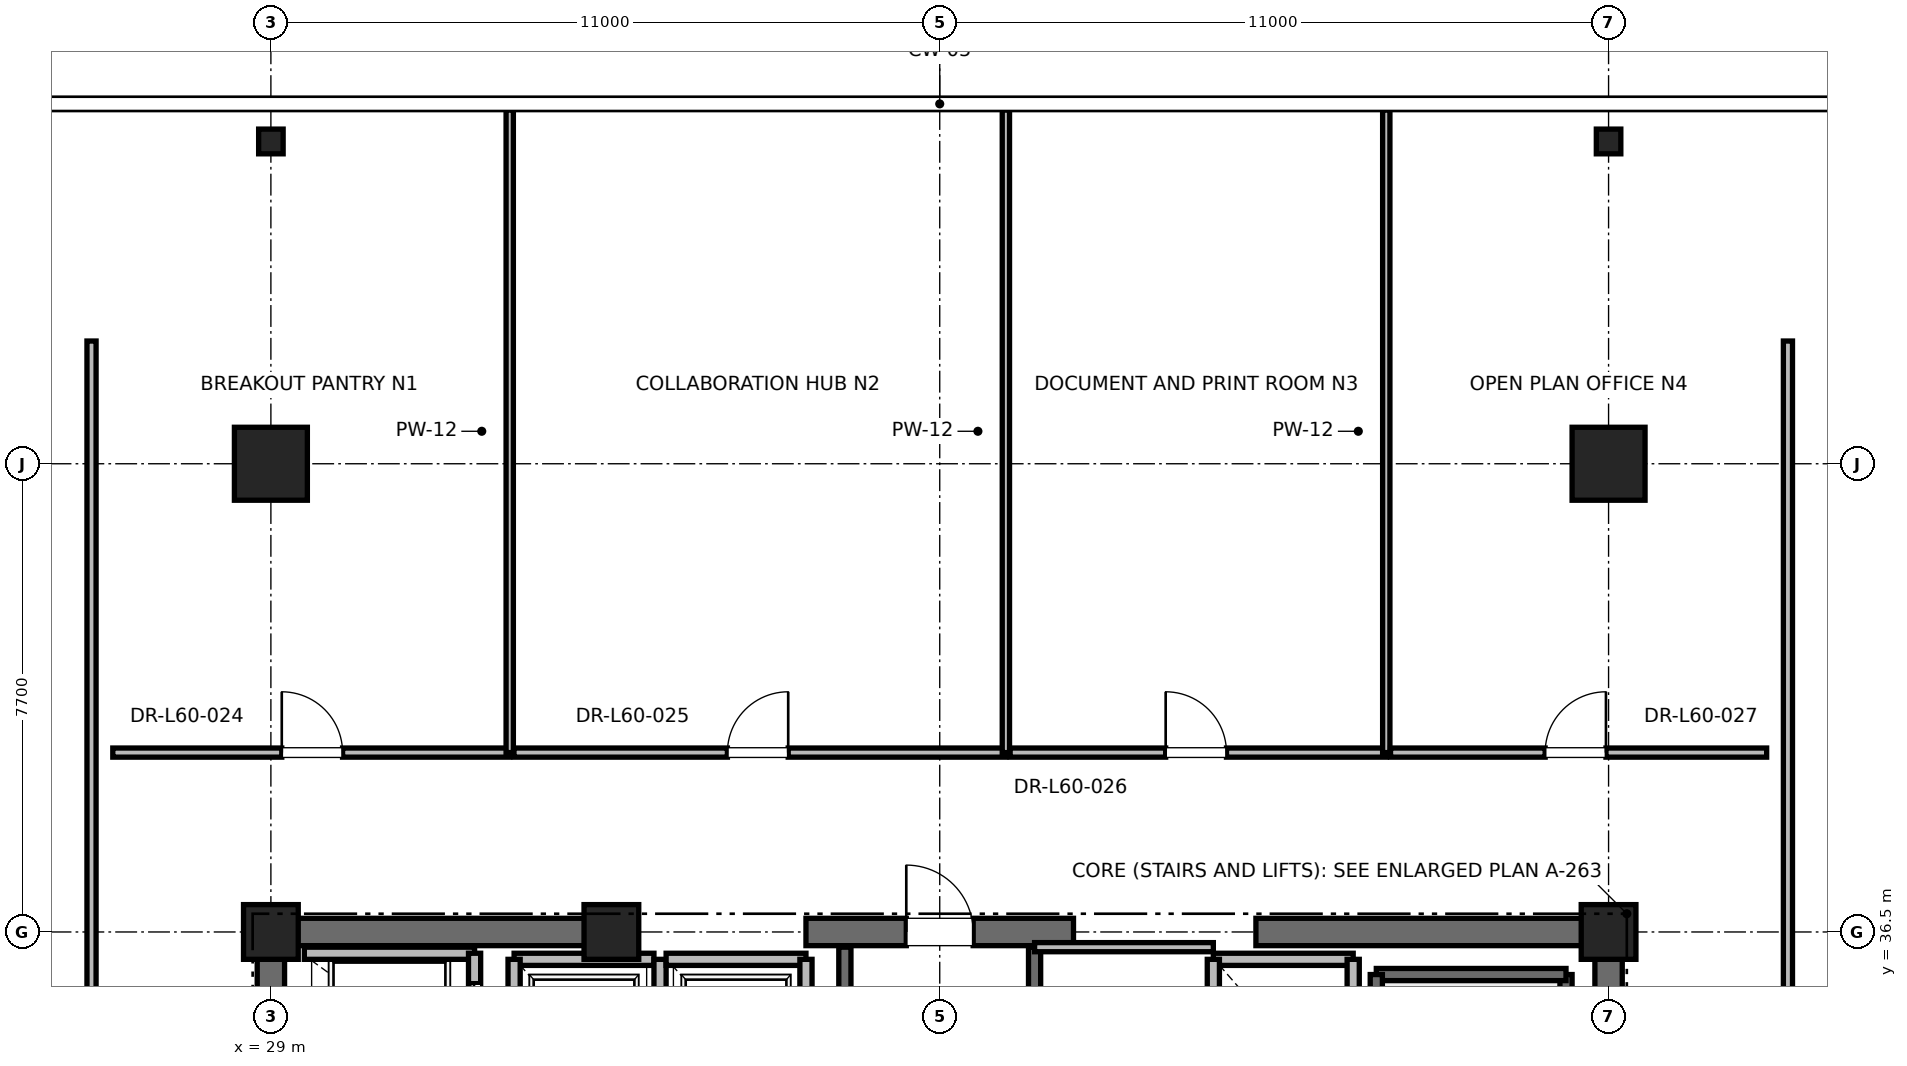
"""IFC4 building model, lengths in metres.
Left out: names, types, materials, properties, quantities, classifications, styles, units other than length and angle.
Written with IfcOpenShell. Run it as: python <this file> out.ifc"""

import sys

from ifc_helpers import new_model, si_unit, direction, frame, frame_2d, origin, origin_2d, place, context, subcontext, project, spatial, rectangle, i_section, extrude, element, fill, save


model = new_model("IFC4")
c1 = context("Model", 3, precision=1e-05, world=origin(), true_north=direction((0.0, 1.0)))
c2 = subcontext(c1, "Body", "Model", "MODEL_VIEW")
j1 = project(units=[si_unit("LENGTHUNIT", "METRE"), si_unit("PLANEANGLEUNIT", "RADIAN")], contexts=[c1])
p1 = place(None, origin())
s1 = spatial("IfcSite", under=j1, at=p1, CompositionType="ELEMENT")
p2 = place(p1, origin())
s2 = spatial("IfcBuilding", under=s1, at=p2, CompositionType="ELEMENT")
p3 = place(p2, frame((0.0, 0.0, 259.2)))
s3 = spatial("IfcBuildingStorey", under=s2, at=p3, CompositionType="ELEMENT", Elevation=259.2)
for number, where, z_axis, x_axis in (
    (1, (29.0, 44.2, 0.0), (0.0, 0.0, 1.0), (1.0, 0.0, 0.0)),
    (2, (51.0, 44.2, 0.0), (0.0, 0.0, 1.0), (1.0, 0.0, 0.0)),
):
    element("IfcColumn", number, at=place(p3, frame(where, z_axis=z_axis, x_axis=x_axis)), inside=s3, PredefinedType="COLUMN", context=c2, shape_type="SweptSolid", body=[
        extrude(rectangle(XDim=1.2, YDim=1.2, at=origin_2d()), origin(), (0.0, 0.0, 1.0), 4.0),
    ])
for number, where, z_axis, x_axis in (
    (3, (29.0, 49.5, 0.0), (0.0, 0.0, 1.0), (1.0, 0.0, 0.0)),
    (4, (51.0, 49.5, 0.0), (0.0, 0.0, 1.0), (1.0, 0.0, 0.0)),
):
    element("IfcColumn", number, at=place(p3, frame(where, z_axis=z_axis, x_axis=x_axis)), inside=s3, PredefinedType="COLUMN", context=c2, shape_type="SweptSolid", body=[
        extrude(i_section(OverallWidth=0.403, OverallDepth=0.406, WebThickness=0.027, FlangeThickness=0.043, FilletRadius=0.015, at=origin_2d()), origin(), (0.0, 0.0, 1.0), 4.0),
    ])
for number, where, z_axis, x_axis in (
    (5, (29.0, 36.5, 0.0), (0.0, 0.0, 1.0), (1.0, 0.0, 0.0)),
    (6, (51.0, 36.5, 0.0), (0.0, 0.0, 1.0), (1.0, 0.0, 0.0)),
    (7, (34.6, 36.5, 0.0), (0.0, 0.0, 1.0), (1.0, 0.0, 0.0)),
):
    element("IfcColumn", number, at=place(p3, frame(where, z_axis=z_axis, x_axis=x_axis)), inside=s3, PredefinedType="PILASTER", context=c2, shape_type="SweptSolid", body=[
        extrude(rectangle(XDim=0.9, YDim=0.9, at=origin_2d()), origin(), (0.0, 0.0, 1.0), 4.0),
    ])
p4 = place(p3, frame((29.0, 36.5, 0.0), z_axis=(0.0, 0.0, 1.0), x_axis=(1.0, 0.0, 0.0)))
e8 = element("IfcWall", 8, at=p4, inside=s3, PredefinedType="SHEAR", context=c2, shape_type="SweptSolid", body=[
    extrude(rectangle(XDim=5.8, YDim=0.45, at=frame_2d((2.9, 0.0))), origin(), (0.0, 0.0, 1.0), 3.785),
])
p5 = place(p3, frame((37.8, 36.5, 0.0), z_axis=(0.0, 0.0, 1.0), x_axis=(1.0, 0.0, 0.0)))
e9 = element("IfcWall", 9, at=p5, inside=s3, PredefinedType="SHEAR", context=c2, shape_type="SweptSolid", body=[
    extrude(rectangle(XDim=4.4, YDim=0.45, at=frame_2d((2.2, 0.0))), origin(), (0.0, 0.0, 1.0), 3.785),
])
p6 = place(p5, frame((1.65, 0.0, 0.0)))
e10 = element("IfcOpeningElement", 10, at=p6, cuts=e9, PredefinedType="OPENING", context=c2, shape_type="SweptSolid", body=[
    extrude(rectangle(XDim=1.1, YDim=2.15, at=frame_2d((0.55, 1.075))), frame((0.0, 0.225, 0.0), z_axis=(0.0, -1.0, 0.0), x_axis=(1.0, 0.0, 0.0)), (0.0, 0.0, 1.0), 0.45),
])
for number, where, z_axis, x_axis in (
    (11, (45.2, 36.5, 0.0), (0.0, 0.0, 1.0), (1.0, 0.0, 0.0)),
    (12, (29.0, 30.7, 0.0), (0.0, 0.0, 1.0), (0.0, 1.0, 0.0)),
):
    element("IfcWall", number, at=place(p3, frame(where, z_axis=z_axis, x_axis=x_axis)), inside=s3, PredefinedType="SHEAR", context=c2, shape_type="SweptSolid", body=[
        extrude(rectangle(XDim=5.8, YDim=0.45, at=frame_2d((2.9, 0.0))), origin(), (0.0, 0.0, 1.0), 3.785),
    ])
p7 = place(p3, frame((51.0, 27.7, 0.0), z_axis=(0.0, 0.0, 1.0), x_axis=(0.0, 1.0, 0.0)))
e13 = element("IfcWall", 13, at=p7, inside=s3, PredefinedType="SHEAR", context=c2, shape_type="SweptSolid", body=[
    extrude(rectangle(XDim=8.8, YDim=0.45, at=frame_2d((4.4, 0.0))), origin(), (0.0, 0.0, 1.0), 3.785),
])
p8 = place(p3, frame((50.3, 27.65, 0.0), z_axis=(0.0, 0.0, 1.0), x_axis=(0.0, 1.0, 0.0)))
e14 = element("IfcWall", 14, at=p8, inside=s3, PredefinedType="SOLIDWALL", context=c2, shape_type="SweptSolid", body=[
    extrude(rectangle(XDim=8.15, YDim=0.2, at=frame_2d((4.075, 0.0))), origin(), (0.0, 0.0, 1.0), 3.785),
])
p9 = place(p3, frame((47.18, 35.8, 0.0), z_axis=(0.0, 0.0, 1.0), x_axis=(1.0, 0.0, 0.0)))
e15 = element("IfcWall", 15, at=p9, inside=s3, PredefinedType="SOLIDWALL", context=c2, shape_type="SweptSolid", body=[
    extrude(rectangle(XDim=3.12, YDim=0.2, at=frame_2d((1.56, 0.0))), origin(), (0.0, 0.0, 1.0), 3.785),
])
p10 = place(p3, frame((47.18, 27.62, 0.0), z_axis=(0.0, 0.0, 1.0), x_axis=(0.0, 1.0, 0.0)))
e16 = element("IfcWall", 16, at=p10, inside=s3, PredefinedType="SOLIDWALL", context=c2, shape_type="SweptSolid", body=[
    extrude(rectangle(XDim=8.18, YDim=0.2, at=frame_2d((4.09, 0.0))), origin(), (0.0, 0.0, 1.0), 3.785),
])
p11 = place(p3, frame((38.44, 27.38, 0.0), z_axis=(0.0, 0.0, 1.0), x_axis=(0.0, 1.0, 0.0)))
e17 = element("IfcWall", 17, at=p11, inside=s3, PredefinedType="SOLIDWALL", context=c2, shape_type="SweptSolid", body=[
    extrude(rectangle(XDim=8.87, YDim=0.2, at=frame_2d((4.435, 0.0))), origin(), (0.0, 0.0, 1.0), 3.785),
])
p12 = place(p3, frame((41.56, 27.68, 0.0), z_axis=(0.0, 0.0, 1.0), x_axis=(0.0, 1.0, 0.0)))
e18 = element("IfcWall", 18, at=p12, inside=s3, PredefinedType="SOLIDWALL", context=c2, shape_type="SweptSolid", body=[
    extrude(rectangle(XDim=8.57, YDim=0.2, at=frame_2d((4.285, 0.0))), origin(), (0.0, 0.0, 1.0), 3.785),
])
p13 = place(p3, frame((32.35, 36.15, 0.0), z_axis=(0.0, 0.0, 1.0), x_axis=(-1.0, 0.0, 0.0)))
e19 = element("IfcWall", 19, at=p13, inside=s3, PredefinedType="SOLIDWALL", context=c2, shape_type="SweptSolid", body=[
    extrude(rectangle(XDim=2.8, YDim=0.2, at=frame_2d((1.4, 0.0))), origin(), (0.0, 0.0, 1.0), 3.148),
])
p14 = place(p3, frame((32.35, 34.05, 0.0), z_axis=(0.0, 0.0, 1.0), x_axis=(0.0, 1.0, 0.0)))
e20 = element("IfcWall", 20, at=p14, inside=s3, PredefinedType="SOLIDWALL", context=c2, shape_type="SweptSolid", body=[
    extrude(rectangle(XDim=2.1, YDim=0.2, at=frame_2d((1.05, 0.0))), origin(), (0.0, 0.0, 1.0), 3.785),
])
p15 = place(p14, frame((0.5, 0.0, 0.0)))
e21 = element("IfcOpeningElement", 21, at=p15, cuts=e20, PredefinedType="OPENING", context=c2, shape_type="SweptSolid", body=[
    extrude(rectangle(XDim=1.1, YDim=2.2, at=frame_2d((0.55, 1.1))), frame((0.0, 0.1, 0.0), z_axis=(0.0, -1.0, 0.0), x_axis=(1.0, 0.0, 0.0)), (0.0, 0.0, 1.0), 0.2),
])
p16 = place(p3, frame((35.3, 36.05, 0.0), z_axis=(0.0, 0.0, 1.0), x_axis=(-1.0, 0.0, 0.0)))
e22 = element("IfcWall", 22, at=p16, inside=s3, PredefinedType="SOLIDWALL", context=c2, shape_type="SweptSolid", body=[
    extrude(rectangle(XDim=2.3, YDim=0.2, at=frame_2d((1.15, 0.0))), origin(), (0.0, 0.0, 1.0), 2.865),
])
p17 = place(p3, frame((33.0, 36.05, 0.0), z_axis=(0.0, 0.0, 1.0), x_axis=(0.0, -1.0, 0.0)))
e23 = element("IfcWall", 23, at=p17, inside=s3, PredefinedType="SOLIDWALL", context=c2, shape_type="SweptSolid", body=[
    extrude(rectangle(XDim=2.6, YDim=0.2, at=frame_2d((1.3, 0.0))), origin(), (0.0, 0.0, 1.0), 3.785),
])
p18 = place(p3, frame((35.4, 33.45, 0.0), z_axis=(0.0, 0.0, 1.0), x_axis=(0.0, 1.0, 0.0)))
e24 = element("IfcWall", 24, at=p18, inside=s3, PredefinedType="SOLIDWALL", context=c2, shape_type="SweptSolid", body=[
    extrude(rectangle(XDim=2.6, YDim=0.2, at=frame_2d((1.3, 0.0))), origin(), (0.0, 0.0, 1.0), 2.865),
])
p19 = place(p3, frame((37.8, 36.05, 0.0), z_axis=(0.0, 0.0, 1.0), x_axis=(-1.0, 0.0, 0.0)))
e25 = element("IfcWall", 25, at=p19, inside=s3, PredefinedType="SOLIDWALL", context=c2, shape_type="SweptSolid", body=[
    extrude(rectangle(XDim=2.3, YDim=0.2, at=frame_2d((1.15, 0.0))), origin(), (0.0, 0.0, 1.0), 2.865),
])
p20 = place(p3, frame((37.8, 33.45, 0.0), z_axis=(0.0, 0.0, 1.0), x_axis=(0.0, 1.0, 0.0)))
e26 = element("IfcWall", 26, at=p20, inside=s3, PredefinedType="SOLIDWALL", context=c2, shape_type="SweptSolid", body=[
    extrude(rectangle(XDim=2.6, YDim=0.2, at=frame_2d((1.3, 0.0))), origin(), (0.0, 0.0, 1.0), 2.865),
])
p21 = place(p3, frame((46.8, 36.05, 0.0), z_axis=(0.0, 0.0, 1.0), x_axis=(-1.0, 0.0, 0.0)))
e27 = element("IfcWall", 27, at=p21, inside=s3, PredefinedType="SOLIDWALL", context=c2, shape_type="SweptSolid", body=[
    extrude(rectangle(XDim=2.3, YDim=0.2, at=frame_2d((1.15, 0.0))), origin(), (0.0, 0.0, 1.0), 2.865),
])
p22 = place(p3, frame((44.5, 36.05, 0.0), z_axis=(0.0, 0.0, 1.0), x_axis=(0.0, -1.0, 0.0)))
e28 = element("IfcWall", 28, at=p22, inside=s3, PredefinedType="SOLIDWALL", context=c2, shape_type="SweptSolid", body=[
    extrude(rectangle(XDim=2.6, YDim=0.2, at=frame_2d((1.3, 0.0))), origin(), (0.0, 0.0, 1.0), 2.865),
])
p23 = place(p3, frame((46.8, 33.45, 0.0), z_axis=(0.0, 0.0, 1.0), x_axis=(0.0, 1.0, 0.0)))
e29 = element("IfcWall", 29, at=p23, inside=s3, PredefinedType="SOLIDWALL", context=c2, shape_type="SweptSolid", body=[
    extrude(rectangle(XDim=2.6, YDim=0.2, at=frame_2d((1.3, 0.0))), origin(), (0.0, 0.0, 1.0), 3.785),
])
p24 = place(p3, frame((41.56, 36.25, 0.0), z_axis=(0.0, 0.0, 1.0), x_axis=(1.0, 0.0, 0.0)))
e30 = element("IfcWall", 30, at=p24, inside=s3, PredefinedType="PARTITIONING", context=c2, shape_type="SweptSolid", body=[
    extrude(rectangle(XDim=2.94, YDim=0.15, at=frame_2d((1.47, 0.0))), origin(), (0.0, 0.0, 1.0), 2.85),
])
p25 = place(p3, frame((26.4, 39.45, 0.0), z_axis=(0.0, 0.0, 1.0), x_axis=(1.0, 0.0, 0.0)))
e31 = element("IfcWall", 31, at=p25, inside=s3, PredefinedType="PARTITIONING", context=c2, shape_type="SweptSolid", body=[
    extrude(rectangle(XDim=6.528, YDim=0.15, at=frame_2d((3.264, 0.0))), origin(), (0.0, 0.0, 1.0), 2.85),
])
p26 = place(p25, frame((2.779, 0.0, 0.0)))
e32 = element("IfcOpeningElement", 32, at=p26, cuts=e31, PredefinedType="OPENING", context=c2, shape_type="SweptSolid", body=[
    extrude(rectangle(XDim=1.0, YDim=2.15, at=frame_2d((0.5, 1.075))), frame((0.0, 0.075, 0.0), z_axis=(0.0, -1.0, 0.0), x_axis=(1.0, 0.0, 0.0)), (0.0, 0.0, 1.0), 0.15),
])
p27 = place(p3, frame((32.928, 39.45, 0.0), z_axis=(0.0, 0.0, 1.0), x_axis=(0.0, 1.0, 0.0)))
e33 = element("IfcWall", 33, at=p27, inside=s3, PredefinedType="PARTITIONING", context=c2, shape_type="SweptSolid", body=[
    extrude(rectangle(XDim=10.568, YDim=0.12, at=frame_2d((5.284, 0.0))), origin(), (0.0, 0.0, 1.0), 2.415),
])
p28 = place(p3, frame((32.998, 39.45, 0.0), z_axis=(0.0, 0.0, 1.0), x_axis=(1.0, 0.0, 0.0)))
e34 = element("IfcWall", 34, at=p28, inside=s3, PredefinedType="PARTITIONING", context=c2, shape_type="SweptSolid", body=[
    extrude(rectangle(XDim=8.09, YDim=0.15, at=frame_2d((4.045, 0.0))), origin(), (0.0, 0.0, 1.0), 2.85),
])
p29 = place(p28, frame((3.51, 0.0, 0.0)))
e35 = element("IfcOpeningElement", 35, at=p29, cuts=e34, PredefinedType="OPENING", context=c2, shape_type="SweptSolid", body=[
    extrude(rectangle(XDim=1.0, YDim=2.15, at=frame_2d((0.5, 1.075))), frame((0.0, 0.075, 0.0), z_axis=(0.0, -1.0, 0.0), x_axis=(1.0, 0.0, 0.0)), (0.0, 0.0, 1.0), 0.15),
])
p30 = place(p3, frame((41.088, 39.45, 0.0), z_axis=(0.0, 0.0, 1.0), x_axis=(0.0, 1.0, 0.0)))
e36 = element("IfcWall", 36, at=p30, inside=s3, PredefinedType="PARTITIONING", context=c2, shape_type="SweptSolid", body=[
    extrude(rectangle(XDim=10.568, YDim=0.12, at=frame_2d((5.284, 0.0))), origin(), (0.0, 0.0, 1.0), 2.415),
])
p31 = place(p3, frame((41.158, 39.45, 0.0), z_axis=(0.0, 0.0, 1.0), x_axis=(1.0, 0.0, 0.0)))
e37 = element("IfcWall", 37, at=p31, inside=s3, PredefinedType="PARTITIONING", context=c2, shape_type="SweptSolid", body=[
    extrude(rectangle(XDim=6.186, YDim=0.15, at=frame_2d((3.093, 0.0))), origin(), (0.0, 0.0, 1.0), 2.85),
])
p32 = place(p31, frame((2.558, 0.0, 0.0)))
e38 = element("IfcOpeningElement", 38, at=p32, cuts=e37, PredefinedType="OPENING", context=c2, shape_type="SweptSolid", body=[
    extrude(rectangle(XDim=1.0, YDim=2.15, at=frame_2d((0.5, 1.075))), frame((0.0, 0.075, 0.0), z_axis=(0.0, -1.0, 0.0), x_axis=(1.0, 0.0, 0.0)), (0.0, 0.0, 1.0), 0.15),
])
p33 = place(p3, frame((47.344, 39.45, 0.0), z_axis=(0.0, 0.0, 1.0), x_axis=(0.0, 1.0, 0.0)))
e39 = element("IfcWall", 39, at=p33, inside=s3, PredefinedType="PARTITIONING", context=c2, shape_type="SweptSolid", body=[
    extrude(rectangle(XDim=10.568, YDim=0.12, at=frame_2d((5.284, 0.0))), origin(), (0.0, 0.0, 1.0), 2.415),
])
p34 = place(p3, frame((47.414, 39.45, 0.0), z_axis=(0.0, 0.0, 1.0), x_axis=(1.0, 0.0, 0.0)))
e40 = element("IfcWall", 40, at=p34, inside=s3, PredefinedType="PARTITIONING", context=c2, shape_type="SweptSolid", body=[
    extrude(rectangle(XDim=6.186, YDim=0.15, at=frame_2d((3.093, 0.0))), origin(), (0.0, 0.0, 1.0), 2.85),
])
p35 = place(p34, frame((2.543, 0.0, 0.0)))
e41 = element("IfcOpeningElement", 41, at=p35, cuts=e40, PredefinedType="OPENING", context=c2, shape_type="SweptSolid", body=[
    extrude(rectangle(XDim=1.0, YDim=2.15, at=frame_2d((0.5, 1.075))), frame((0.0, 0.075, 0.0), z_axis=(0.0, -1.0, 0.0), x_axis=(1.0, 0.0, 0.0)), (0.0, 0.0, 1.0), 0.15),
])
p36 = place(p3, frame((26.05, 24.575, 0.0), z_axis=(0.0, 0.0, 1.0), x_axis=(0.0, 1.0, 0.0)))
e42 = element("IfcWall", 42, at=p36, inside=s3, PredefinedType="PARTITIONING", context=c2, shape_type="SweptSolid", body=[
    extrude(rectangle(XDim=21.643, YDim=0.15, at=frame_2d((10.822, 0.0))), origin(), (0.0, 0.0, 1.0), 2.85),
])
p37 = place(p36, frame((5.412, 0.0, 0.0)))
e43 = element("IfcOpeningElement", 43, at=p37, cuts=e42, PredefinedType="OPENING", context=c2, shape_type="SweptSolid", body=[
    extrude(rectangle(XDim=1.0, YDim=2.15, at=frame_2d((0.5, 1.075))), frame((0.0, 0.075, 0.0), z_axis=(0.0, -1.0, 0.0), x_axis=(1.0, 0.0, 0.0)), (0.0, 0.0, 1.0), 0.15),
])
p38 = place(p3, frame((53.95, 33.56, 0.0), z_axis=(0.0, 0.0, 1.0), x_axis=(0.0, 1.0, 0.0)))
e44 = element("IfcWall", 44, at=p38, inside=s3, PredefinedType="PARTITIONING", context=c2, shape_type="SweptSolid", body=[
    extrude(rectangle(XDim=12.658, YDim=0.15, at=frame_2d((6.329, 0.0))), origin(), (0.0, 0.0, 1.0), 2.85),
])
p39 = place(p38, frame((0.92, 0.0, 0.0)))
e45 = element("IfcOpeningElement", 45, at=p39, cuts=e44, PredefinedType="OPENING", context=c2, shape_type="SweptSolid", body=[
    extrude(rectangle(XDim=1.0, YDim=2.15, at=frame_2d((0.5, 1.075))), frame((0.0, 0.075, 0.0), z_axis=(0.0, -1.0, 0.0), x_axis=(1.0, 0.0, 0.0)), (0.0, 0.0, 1.0), 0.15),
])
p40 = place(p6, origin())
e46 = element("IfcDoor", 46, at=p40, inside=s3, OperationType="SINGLE_SWING_LEFT", PredefinedType="DOOR", context=c2, shape_type="SweptSolid", body=[
    extrude(rectangle(XDim=1.1, YDim=2.15, at=frame_2d((0.55, 1.075))), frame((0.0, 0.025, 0.0), z_axis=(0.0, -1.0, 0.0), x_axis=(1.0, 0.0, 0.0)), (0.0, 0.0, 1.0), 0.05),
])
fill(e10, e46)
p41 = place(p15, origin())
e47 = element("IfcDoor", 47, at=p41, inside=s3, OperationType="SLIDING_TO_RIGHT", PredefinedType="DOOR", context=c2, shape_type="SweptSolid", body=[
    extrude(rectangle(XDim=1.1, YDim=2.2, at=frame_2d((0.55, 1.1))), frame((0.0, 0.025, 0.0), z_axis=(0.0, -1.0, 0.0), x_axis=(1.0, 0.0, 0.0)), (0.0, 0.0, 1.0), 0.05),
])
fill(e21, e47)
p42 = place(p26, origin())
e48 = element("IfcDoor", 48, at=p42, inside=s3, OperationType="SINGLE_SWING_LEFT", PredefinedType="DOOR", context=c2, shape_type="SweptSolid", body=[
    extrude(rectangle(XDim=1.0, YDim=2.15, at=frame_2d((0.5, 1.075))), frame((0.0, 0.025, 0.0), z_axis=(0.0, -1.0, 0.0), x_axis=(1.0, 0.0, 0.0)), (0.0, 0.0, 1.0), 0.05),
])
fill(e32, e48)
p43 = place(p29, origin())
e49 = element("IfcDoor", 49, at=p43, inside=s3, OperationType="SINGLE_SWING_RIGHT", PredefinedType="DOOR", context=c2, shape_type="SweptSolid", body=[
    extrude(rectangle(XDim=1.0, YDim=2.15, at=frame_2d((0.5, 1.075))), frame((0.0, 0.025, 0.0), z_axis=(0.0, -1.0, 0.0), x_axis=(1.0, 0.0, 0.0)), (0.0, 0.0, 1.0), 0.05),
])
fill(e35, e49)
p44 = place(p32, origin())
e50 = element("IfcDoor", 50, at=p44, inside=s3, OperationType="SINGLE_SWING_LEFT", PredefinedType="DOOR", context=c2, shape_type="SweptSolid", body=[
    extrude(rectangle(XDim=1.0, YDim=2.15, at=frame_2d((0.5, 1.075))), frame((0.0, 0.025, 0.0), z_axis=(0.0, -1.0, 0.0), x_axis=(1.0, 0.0, 0.0)), (0.0, 0.0, 1.0), 0.05),
])
fill(e38, e50)
p45 = place(p35, origin())
e51 = element("IfcDoor", 51, at=p45, inside=s3, OperationType="SINGLE_SWING_RIGHT", PredefinedType="DOOR", context=c2, shape_type="SweptSolid", body=[
    extrude(rectangle(XDim=1.0, YDim=2.15, at=frame_2d((0.5, 1.075))), frame((0.0, 0.025, 0.0), z_axis=(0.0, -1.0, 0.0), x_axis=(1.0, 0.0, 0.0)), (0.0, 0.0, 1.0), 0.05),
])
fill(e41, e51)
save(model, sys.argv[1])
